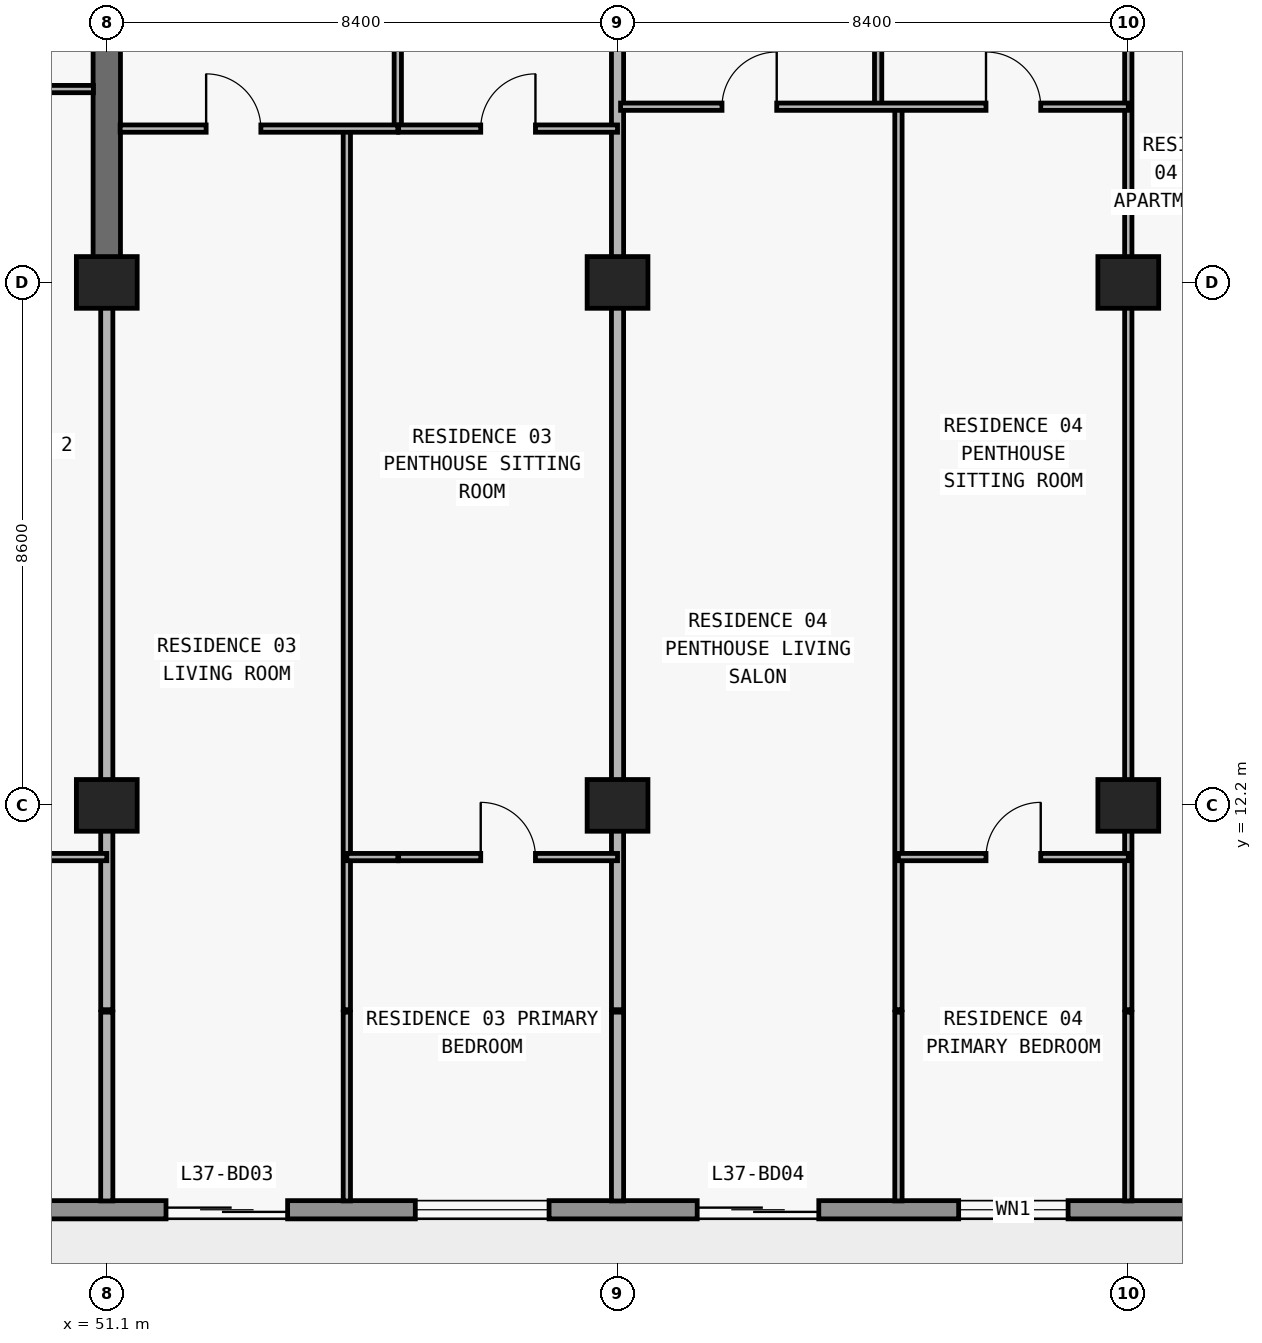
"""IFC4 building model, lengths in metres.
Left out: names, types, materials, properties, quantities, classifications, styles, units other than length and angle.
Written with IfcOpenShell. Run it as: python <this file> out.ifc"""

import sys

from ifc_helpers import new_model, si_unit, direction, frame, frame_2d, origin, origin_2d, place, context, subcontext, project, spatial, rectangle, extrude, element, fill, save


model = new_model("IFC4")
c1 = context("Model", 3, precision=1e-05, world=origin(), true_north=direction((0.0, 1.0)))
c2 = subcontext(c1, "Body", "Model", "MODEL_VIEW")
j1 = project(units=[si_unit("LENGTHUNIT", "METRE"), si_unit("PLANEANGLEUNIT", "RADIAN")], contexts=[c1])
p1 = place(None, origin())
s1 = spatial("IfcSite", under=j1, at=p1, CompositionType="ELEMENT")
p2 = place(p1, origin())
s2 = spatial("IfcBuilding", under=s1, at=p2, CompositionType="ELEMENT")
p3 = place(p2, frame((0.0, 0.0, 135.6)))
s3 = spatial("IfcBuildingStorey", under=s2, at=p3, CompositionType="ELEMENT", Elevation=135.6)
for number, where, z_axis, x_axis in (
    (1, (51.1, 12.2, 0.0), (0.0, 0.0, 1.0), (1.0, 0.0, 0.0)),
    (2, (59.5, 12.2, 0.0), (0.0, 0.0, 1.0), (1.0, 0.0, 0.0)),
    (3, (67.9, 12.2, 0.0), (0.0, 0.0, 1.0), (1.0, 0.0, 0.0)),
    (4, (51.1, 20.8, 0.0), (0.0, 0.0, 1.0), (1.0, 0.0, 0.0)),
    (5, (59.5, 20.8, 0.0), (0.0, 0.0, 1.0), (1.0, 0.0, 0.0)),
    (6, (67.9, 20.8, 0.0), (0.0, 0.0, 1.0), (1.0, 0.0, 0.0)),
):
    element("IfcColumn", number, at=place(p3, frame(where, z_axis=z_axis, x_axis=x_axis)), inside=s3, PredefinedType="COLUMN", context=c2, shape_type="SweptSolid", body=[
        extrude(rectangle(XDim=1.0, YDim=0.85, at=origin_2d()), origin(), (0.0, 0.0, 1.0), 3.05),
    ])
p4 = place(p3, frame((51.1, 20.8, 0.0), z_axis=(0.0, 0.0, 1.0), x_axis=(0.0, 1.0, 0.0)))
e7 = element("IfcWall", 7, at=p4, inside=s3, PredefinedType="SHEAR", context=c2, shape_type="SweptSolid", body=[
    extrude(rectangle(XDim=8.6, YDim=0.45, at=frame_2d((4.3, 0.0))), origin(), (0.0, 0.0, 1.0), 3.05),
])
p5 = place(p3, frame((70.1, 5.55, 0.0), z_axis=(0.0, 0.0, 1.0), x_axis=(-1.0, 0.0, 0.0)))
e8 = element("IfcWall", 8, at=p5, inside=s3, PredefinedType="STANDARD", context=c2, shape_type="SweptSolid", body=[
    extrude(rectangle(XDim=62.4, YDim=0.3, at=frame_2d((31.2, 0.0))), origin(), (0.0, 0.0, 1.0), 3.05),
])
p6 = place(p5, frame((57.29, 0.0, 0.0)))
e9 = element("IfcOpeningElement", 9, at=p6, cuts=e8, PredefinedType="OPENING", context=c2, shape_type="SweptSolid", body=[
    extrude(rectangle(XDim=2.0, YDim=2.3, at=frame_2d((1.0, 1.15))), frame((0.0, 0.16, 0.0), z_axis=(0.0, -1.0, 0.0), x_axis=(1.0, 0.0, 0.0)), (0.0, 0.0, 1.0), 0.32),
])
p7 = place(p5, frame((52.61, 0.0, 0.65)))
e10 = element("IfcOpeningElement", 10, at=p7, cuts=e8, PredefinedType="OPENING", context=c2, shape_type="SweptSolid", body=[
    extrude(rectangle(XDim=2.6, YDim=1.85, at=frame_2d((1.3, 0.925))), frame((0.0, 0.16, 0.0), z_axis=(0.0, -1.0, 0.0), x_axis=(1.0, 0.0, 0.0)), (0.0, 0.0, 1.0), 0.32),
])
p8 = place(p5, frame((46.5, 0.0, 0.85)))
e11 = element("IfcOpeningElement", 11, at=p8, cuts=e8, PredefinedType="OPENING", context=c2, shape_type="SweptSolid", body=[
    extrude(rectangle(XDim=2.2, YDim=1.55, at=frame_2d((1.1, 0.775))), frame((0.0, 0.16, 0.0), z_axis=(0.0, -1.0, 0.0), x_axis=(1.0, 0.0, 0.0)), (0.0, 0.0, 1.0), 0.32),
])
p9 = place(p5, frame((40.49, 0.0, 0.0)))
e12 = element("IfcOpeningElement", 12, at=p9, cuts=e8, PredefinedType="OPENING", context=c2, shape_type="SweptSolid", body=[
    extrude(rectangle(XDim=2.0, YDim=2.3, at=frame_2d((1.0, 1.15))), frame((0.0, 0.16, 0.0), z_axis=(0.0, -1.0, 0.0), x_axis=(1.0, 0.0, 0.0)), (0.0, 0.0, 1.0), 0.32),
])
p10 = place(p5, frame((35.81, 0.0, 0.65)))
e13 = element("IfcOpeningElement", 13, at=p10, cuts=e8, PredefinedType="OPENING", context=c2, shape_type="SweptSolid", body=[
    extrude(rectangle(XDim=2.6, YDim=1.85, at=frame_2d((1.3, 0.925))), frame((0.0, 0.16, 0.0), z_axis=(0.0, -1.0, 0.0), x_axis=(1.0, 0.0, 0.0)), (0.0, 0.0, 1.0), 0.32),
])
p11 = place(p5, frame((30.1, 0.0, 0.85)))
e14 = element("IfcOpeningElement", 14, at=p11, cuts=e8, PredefinedType="OPENING", context=c2, shape_type="SweptSolid", body=[
    extrude(rectangle(XDim=2.2, YDim=1.55, at=frame_2d((1.1, 0.775))), frame((0.0, 0.16, 0.0), z_axis=(0.0, -1.0, 0.0), x_axis=(1.0, 0.0, 0.0)), (0.0, 0.0, 1.0), 0.32),
])
p12 = place(p5, frame((22.1, 0.0, 0.85)))
e15 = element("IfcOpeningElement", 15, at=p12, cuts=e8, PredefinedType="OPENING", context=c2, shape_type="SweptSolid", body=[
    extrude(rectangle(XDim=2.2, YDim=1.55, at=frame_2d((1.1, 0.775))), frame((0.0, 0.16, 0.0), z_axis=(0.0, -1.0, 0.0), x_axis=(1.0, 0.0, 0.0)), (0.0, 0.0, 1.0), 0.32),
])
p13 = place(p5, frame((16.026, 0.0, 0.0)))
e16 = element("IfcOpeningElement", 16, at=p13, cuts=e8, PredefinedType="OPENING", context=c2, shape_type="SweptSolid", body=[
    extrude(rectangle(XDim=2.0, YDim=2.3, at=frame_2d((1.0, 1.15))), frame((0.0, 0.16, 0.0), z_axis=(0.0, -1.0, 0.0), x_axis=(1.0, 0.0, 0.0)), (0.0, 0.0, 1.0), 0.32),
])
p14 = place(p5, frame((11.726, 0.0, 0.85)))
e17 = element("IfcOpeningElement", 17, at=p14, cuts=e8, PredefinedType="OPENING", context=c2, shape_type="SweptSolid", body=[
    extrude(rectangle(XDim=2.2, YDim=1.55, at=frame_2d((1.1, 0.775))), frame((0.0, 0.16, 0.0), z_axis=(0.0, -1.0, 0.0), x_axis=(1.0, 0.0, 0.0)), (0.0, 0.0, 1.0), 0.32),
])
p15 = place(p5, frame((7.29, 0.0, 0.0)))
e18 = element("IfcOpeningElement", 18, at=p15, cuts=e8, PredefinedType="OPENING", context=c2, shape_type="SweptSolid", body=[
    extrude(rectangle(XDim=2.0, YDim=2.3, at=frame_2d((1.0, 1.15))), frame((0.0, 0.16, 0.0), z_axis=(0.0, -1.0, 0.0), x_axis=(1.0, 0.0, 0.0)), (0.0, 0.0, 1.0), 0.32),
])
p16 = place(p5, frame((3.19, 0.0, 0.85)))
e19 = element("IfcOpeningElement", 19, at=p16, cuts=e8, PredefinedType="OPENING", context=c2, shape_type="SweptSolid", body=[
    extrude(rectangle(XDim=1.8, YDim=1.55, at=frame_2d((0.9, 0.775))), frame((0.0, 0.16, 0.0), z_axis=(0.0, -1.0, 0.0), x_axis=(1.0, 0.0, 0.0)), (0.0, 0.0, 1.0), 0.32),
])
p17 = place(p3, frame((51.1, 5.695, 0.0), z_axis=(0.0, 0.0, 1.0), x_axis=(0.0, 1.0, 0.0)))
e20 = element("IfcWall", 20, at=p17, inside=s3, PredefinedType="PARTITIONING", context=c2, shape_type="SweptSolid", body=[
    extrude(rectangle(XDim=3.105, YDim=0.2, at=frame_2d((1.552, 0.0))), origin(), (0.0, 0.0, 1.0), 3.05),
])
p18 = place(p3, frame((51.1, 8.84, 0.0), z_axis=(0.0, 0.0, 1.0), x_axis=(0.0, 1.0, 0.0)))
e21 = element("IfcWall", 21, at=p18, inside=s3, PredefinedType="PARTITIONING", context=c2, shape_type="SweptSolid", body=[
    extrude(rectangle(XDim=11.955, YDim=0.2, at=frame_2d((5.978, 0.0))), origin(), (0.0, 0.0, 1.0), 2.174),
])
p19 = place(p3, frame((55.048, 5.695, 0.0), z_axis=(0.0, 0.0, 1.0), x_axis=(0.0, 1.0, 0.0)))
e22 = element("IfcWall", 22, at=p19, inside=s3, PredefinedType="PARTITIONING", context=c2, shape_type="SweptSolid", body=[
    extrude(rectangle(XDim=3.105, YDim=0.12, at=frame_2d((1.552, 0.0))), origin(), (0.0, 0.0, 1.0), 3.05),
])
p20 = place(p3, frame((55.048, 8.84, 0.0), z_axis=(0.0, 0.0, 1.0), x_axis=(0.0, 1.0, 0.0)))
e23 = element("IfcWall", 23, at=p20, inside=s3, PredefinedType="PARTITIONING", context=c2, shape_type="SweptSolid", body=[
    extrude(rectangle(XDim=14.49, YDim=0.12, at=frame_2d((7.245, 0.0))), origin(), (0.0, 0.0, 1.0), 3.05),
])
p21 = place(p3, frame((55.886, 23.33, 0.0), z_axis=(0.0, 0.0, 1.0), x_axis=(0.0, 1.0, 0.0)))
e24 = element("IfcWall", 24, at=p21, inside=s3, PredefinedType="PARTITIONING", context=c2, shape_type="SweptSolid", body=[
    extrude(rectangle(XDim=5.15, YDim=0.12, at=frame_2d((2.575, 0.0))), origin(), (0.0, 0.0, 1.0), 3.05),
])
p22 = place(p21, frame((2.125, 0.0, 0.0)))
e25 = element("IfcOpeningElement", 25, at=p22, cuts=e24, PredefinedType="OPENING", context=c2, shape_type="SweptSolid", body=[
    extrude(rectangle(XDim=0.9, YDim=2.15, at=frame_2d((0.45, 1.075))), frame((0.0, 0.07, 0.0), z_axis=(0.0, -1.0, 0.0), x_axis=(1.0, 0.0, 0.0)), (0.0, 0.0, 1.0), 0.14),
])
p23 = place(p3, frame((59.5, 5.695, 0.0), z_axis=(0.0, 0.0, 1.0), x_axis=(0.0, 1.0, 0.0)))
e26 = element("IfcWall", 26, at=p23, inside=s3, PredefinedType="PARTITIONING", context=c2, shape_type="SweptSolid", body=[
    extrude(rectangle(XDim=3.105, YDim=0.2, at=frame_2d((1.552, 0.0))), origin(), (0.0, 0.0, 1.0), 3.05),
])
p24 = place(p3, frame((59.5, 8.84, 0.0), z_axis=(0.0, 0.0, 1.0), x_axis=(0.0, 1.0, 0.0)))
e27 = element("IfcWall", 27, at=p24, inside=s3, PredefinedType="PARTITIONING", context=c2, shape_type="SweptSolid", body=[
    extrude(rectangle(XDim=19.94, YDim=0.2, at=frame_2d((9.97, 0.0))), origin(), (0.0, 0.0, 1.0), 2.174),
])
p25 = place(p3, frame((63.786, 23.69, 0.0), z_axis=(0.0, 0.0, 1.0), x_axis=(0.0, 1.0, 0.0)))
e28 = element("IfcWall", 28, at=p25, inside=s3, PredefinedType="PARTITIONING", context=c2, shape_type="SweptSolid", body=[
    extrude(rectangle(XDim=5.09, YDim=0.12, at=frame_2d((2.545, 0.0))), origin(), (0.0, 0.0, 1.0), 2.486),
])
p26 = place(p25, frame((2.095, 0.0, 0.0)))
e29 = element("IfcOpeningElement", 29, at=p26, cuts=e28, PredefinedType="OPENING", context=c2, shape_type="SweptSolid", body=[
    extrude(rectangle(XDim=0.9, YDim=2.15, at=frame_2d((0.45, 1.075))), frame((0.0, 0.07, 0.0), z_axis=(0.0, -1.0, 0.0), x_axis=(1.0, 0.0, 0.0)), (0.0, 0.0, 1.0), 0.14),
])
p27 = place(p3, frame((64.12, 5.695, 0.0), z_axis=(0.0, 0.0, 1.0), x_axis=(0.0, 1.0, 0.0)))
e30 = element("IfcWall", 30, at=p27, inside=s3, PredefinedType="PARTITIONING", context=c2, shape_type="SweptSolid", body=[
    extrude(rectangle(XDim=3.105, YDim=0.12, at=frame_2d((1.552, 0.0))), origin(), (0.0, 0.0, 1.0), 3.05),
])
p28 = place(p3, frame((64.12, 8.84, 0.0), z_axis=(0.0, 0.0, 1.0), x_axis=(0.0, 1.0, 0.0)))
e31 = element("IfcWall", 31, at=p28, inside=s3, PredefinedType="PARTITIONING", context=c2, shape_type="SweptSolid", body=[
    extrude(rectangle(XDim=14.85, YDim=0.12, at=frame_2d((7.425, 0.0))), origin(), (0.0, 0.0, 1.0), 3.05),
])
p29 = place(p3, frame((67.9, 5.695, 0.0), z_axis=(0.0, 0.0, 1.0), x_axis=(0.0, 1.0, 0.0)))
e32 = element("IfcWall", 32, at=p29, inside=s3, PredefinedType="PARTITIONING", context=c2, shape_type="SweptSolid", body=[
    extrude(rectangle(XDim=3.105, YDim=0.12, at=frame_2d((1.552, 0.0))), origin(), (0.0, 0.0, 1.0), 3.05),
])
p30 = place(p3, frame((67.9, 8.84, 0.0), z_axis=(0.0, 0.0, 1.0), x_axis=(0.0, 1.0, 0.0)))
e33 = element("IfcWall", 33, at=p30, inside=s3, PredefinedType="PARTITIONING", context=c2, shape_type="SweptSolid", body=[
    extrude(rectangle(XDim=19.94, YDim=0.12, at=frame_2d((9.97, 0.0))), origin(), (0.0, 0.0, 1.0), 2.174),
])
p31 = place(p30, frame((16.945, 0.0, 0.0)))
e34 = element("IfcOpeningElement", 34, at=p31, cuts=e33, PredefinedType="OPENING", context=c2, shape_type="SweptSolid", body=[
    extrude(rectangle(XDim=0.9, YDim=2.124, at=frame_2d((0.45, 1.062))), frame((0.0, 0.07, 0.0), z_axis=(0.0, -1.0, 0.0), x_axis=(1.0, 0.0, 0.0)), (0.0, 0.0, 1.0), 0.14),
])
p32 = place(p3, frame((35.1, 11.35, 0.0), z_axis=(0.0, 0.0, 1.0), x_axis=(1.0, 0.0, 0.0)))
e35 = element("IfcWall", 35, at=p32, inside=s3, PredefinedType="PARTITIONING", context=c2, shape_type="SweptSolid", body=[
    extrude(rectangle(XDim=16.0, YDim=0.12, at=frame_2d((8.0, 0.0))), origin(), (0.0, 0.0, 1.0), 3.05),
])
p33 = place(p32, frame((3.35, 0.0, 0.0)))
e36 = element("IfcOpeningElement", 36, at=p33, cuts=e35, PredefinedType="OPENING", context=c2, shape_type="SweptSolid", body=[
    extrude(rectangle(XDim=0.9, YDim=2.15, at=frame_2d((0.45, 1.075))), frame((0.0, 0.07, 0.0), z_axis=(0.0, -1.0, 0.0), x_axis=(1.0, 0.0, 0.0)), (0.0, 0.0, 1.0), 0.14),
])
p34 = place(p32, frame((11.35, 0.0, 0.0)))
e37 = element("IfcOpeningElement", 37, at=p34, cuts=e35, PredefinedType="OPENING", context=c2, shape_type="SweptSolid", body=[
    extrude(rectangle(XDim=0.9, YDim=2.15, at=frame_2d((0.45, 1.075))), frame((0.0, 0.07, 0.0), z_axis=(0.0, -1.0, 0.0), x_axis=(1.0, 0.0, 0.0)), (0.0, 0.0, 1.0), 0.14),
])
p35 = place(p3, frame((55.048, 11.35, 0.0), z_axis=(0.0, 0.0, 1.0), x_axis=(1.0, 0.0, 0.0)))
e38 = element("IfcWall", 38, at=p35, inside=s3, PredefinedType="PARTITIONING", context=c2, shape_type="SweptSolid", body=[
    extrude(rectangle(XDim=0.838, YDim=0.12, at=frame_2d((0.419, 0.0))), origin(), (0.0, 0.0, 1.0), 3.05),
])
p36 = place(p3, frame((55.9, 11.35, 0.0), z_axis=(0.0, 0.0, 1.0), x_axis=(1.0, 0.0, 0.0)))
e39 = element("IfcWall", 39, at=p36, inside=s3, PredefinedType="PARTITIONING", context=c2, shape_type="SweptSolid", body=[
    extrude(rectangle(XDim=3.6, YDim=0.12, at=frame_2d((1.8, 0.0))), origin(), (0.0, 0.0, 1.0), 3.05),
])
p37 = place(p36, frame((1.35, 0.0, 0.0)))
e40 = element("IfcOpeningElement", 40, at=p37, cuts=e39, PredefinedType="OPENING", context=c2, shape_type="SweptSolid", body=[
    extrude(rectangle(XDim=0.9, YDim=2.15, at=frame_2d((0.45, 1.075))), frame((0.0, 0.07, 0.0), z_axis=(0.0, -1.0, 0.0), x_axis=(1.0, 0.0, 0.0)), (0.0, 0.0, 1.0), 0.14),
])
p38 = place(p3, frame((64.12, 11.35, 0.0), z_axis=(0.0, 0.0, 1.0), x_axis=(1.0, 0.0, 0.0)))
e41 = element("IfcWall", 41, at=p38, inside=s3, PredefinedType="PARTITIONING", context=c2, shape_type="SweptSolid", body=[
    extrude(rectangle(XDim=3.78, YDim=0.12, at=frame_2d((1.89, 0.0))), origin(), (0.0, 0.0, 1.0), 3.05),
])
p39 = place(p38, frame((1.44, 0.0, 0.0)))
e42 = element("IfcOpeningElement", 42, at=p39, cuts=e41, PredefinedType="OPENING", context=c2, shape_type="SweptSolid", body=[
    extrude(rectangle(XDim=0.9, YDim=2.15, at=frame_2d((0.45, 1.075))), frame((0.0, 0.07, 0.0), z_axis=(0.0, -1.0, 0.0), x_axis=(1.0, 0.0, 0.0)), (0.0, 0.0, 1.0), 0.14),
])
p40 = place(p3, frame((51.32, 23.33, 0.0), z_axis=(0.0, 0.0, 1.0), x_axis=(1.0, 0.0, 0.0)))
e43 = element("IfcWall", 43, at=p40, inside=s3, PredefinedType="PARTITIONING", context=c2, shape_type="SweptSolid", body=[
    extrude(rectangle(XDim=4.566, YDim=0.12, at=frame_2d((2.283, 0.0))), origin(), (0.0, 0.0, 1.0), 3.05),
])
p41 = place(p40, frame((1.414, 0.0, 0.0)))
e44 = element("IfcOpeningElement", 44, at=p41, cuts=e43, PredefinedType="OPENING", context=c2, shape_type="SweptSolid", body=[
    extrude(rectangle(XDim=0.9, YDim=2.15, at=frame_2d((0.45, 1.075))), frame((0.0, 0.07, 0.0), z_axis=(0.0, -1.0, 0.0), x_axis=(1.0, 0.0, 0.0)), (0.0, 0.0, 1.0), 0.14),
])
p42 = place(p3, frame((55.9, 23.33, 0.0), z_axis=(0.0, 0.0, 1.0), x_axis=(1.0, 0.0, 0.0)))
e45 = element("IfcWall", 45, at=p42, inside=s3, PredefinedType="PARTITIONING", context=c2, shape_type="SweptSolid", body=[
    extrude(rectangle(XDim=3.6, YDim=0.12, at=frame_2d((1.8, 0.0))), origin(), (0.0, 0.0, 1.0), 3.05),
])
p43 = place(p42, frame((1.35, 0.0, 0.0)))
e46 = element("IfcOpeningElement", 46, at=p43, cuts=e45, PredefinedType="OPENING", context=c2, shape_type="SweptSolid", body=[
    extrude(rectangle(XDim=0.9, YDim=2.15, at=frame_2d((0.45, 1.075))), frame((0.0, 0.07, 0.0), z_axis=(0.0, -1.0, 0.0), x_axis=(1.0, 0.0, 0.0)), (0.0, 0.0, 1.0), 0.14),
])
p44 = place(p3, frame((59.55, 23.69, 0.0), z_axis=(0.0, 0.0, 1.0), x_axis=(1.0, 0.0, 0.0)))
e47 = element("IfcWall", 47, at=p44, inside=s3, PredefinedType="PARTITIONING", context=c2, shape_type="SweptSolid", body=[
    extrude(rectangle(XDim=8.35, YDim=0.12, at=frame_2d((4.175, 0.0))), origin(), (0.0, 0.0, 1.0), 3.05),
])
p45 = place(p44, frame((1.668, 0.0, 0.0)))
e48 = element("IfcOpeningElement", 48, at=p45, cuts=e47, PredefinedType="OPENING", context=c2, shape_type="SweptSolid", body=[
    extrude(rectangle(XDim=0.9, YDim=2.15, at=frame_2d((0.45, 1.075))), frame((0.0, 0.07, 0.0), z_axis=(0.0, -1.0, 0.0), x_axis=(1.0, 0.0, 0.0)), (0.0, 0.0, 1.0), 0.14),
])
p46 = place(p44, frame((6.01, 0.0, 0.0)))
e49 = element("IfcOpeningElement", 49, at=p46, cuts=e47, PredefinedType="OPENING", context=c2, shape_type="SweptSolid", body=[
    extrude(rectangle(XDim=0.9, YDim=2.15, at=frame_2d((0.45, 1.075))), frame((0.0, 0.07, 0.0), z_axis=(0.0, -1.0, 0.0), x_axis=(1.0, 0.0, 0.0)), (0.0, 0.0, 1.0), 0.14),
])
p47 = place(p3, frame((42.7, 23.98, 0.0), z_axis=(0.0, 0.0, 1.0), x_axis=(1.0, 0.0, 0.0)))
e50 = element("IfcWall", 50, at=p47, inside=s3, PredefinedType="PARTITIONING", context=c2, shape_type="SweptSolid", body=[
    extrude(rectangle(XDim=8.18, YDim=0.12, at=frame_2d((4.09, 0.0))), origin(), (0.0, 0.0, 1.0), 3.05),
])
p48 = place(p47, frame((3.64, 0.0, 0.0)))
e51 = element("IfcOpeningElement", 51, at=p48, cuts=e50, PredefinedType="OPENING", context=c2, shape_type="SweptSolid", body=[
    extrude(rectangle(XDim=0.9, YDim=2.15, at=frame_2d((0.45, 1.075))), frame((0.0, 0.07, 0.0), z_axis=(0.0, -1.0, 0.0), x_axis=(1.0, 0.0, 0.0)), (0.0, 0.0, 1.0), 0.14),
])
p49 = place(p13, origin())
e52 = element("IfcDoor", 52, at=p49, inside=s3, OperationType="DOUBLE_DOOR_SLIDING", PredefinedType="DOOR", context=c2, shape_type="SweptSolid", body=[
    extrude(rectangle(XDim=2.0, YDim=2.3, at=frame_2d((1.0, 1.15))), frame((0.0, 0.025, 0.0), z_axis=(0.0, -1.0, 0.0), x_axis=(1.0, 0.0, 0.0)), (0.0, 0.0, 1.0), 0.05),
])
fill(e16, e52)
p50 = place(p14, origin())
e53 = element("IfcWindow", 53, at=p50, inside=s3, PartitioningType="SINGLE_PANEL", PredefinedType="WINDOW", context=c2, shape_type="SweptSolid", body=[
    extrude(rectangle(XDim=2.2, YDim=1.55, at=frame_2d((1.1, 0.775))), frame((0.0, 0.03, 0.0), z_axis=(0.0, -1.0, 0.0), x_axis=(1.0, 0.0, 0.0)), (0.0, 0.0, 1.0), 0.06),
])
fill(e17, e53)
p51 = place(p15, origin())
e54 = element("IfcDoor", 54, at=p51, inside=s3, OperationType="DOUBLE_DOOR_SLIDING", PredefinedType="DOOR", context=c2, shape_type="SweptSolid", body=[
    extrude(rectangle(XDim=2.0, YDim=2.3, at=frame_2d((1.0, 1.15))), frame((0.0, 0.025, 0.0), z_axis=(0.0, -1.0, 0.0), x_axis=(1.0, 0.0, 0.0)), (0.0, 0.0, 1.0), 0.05),
])
fill(e18, e54)
p52 = place(p16, origin())
e55 = element("IfcWindow", 55, at=p52, inside=s3, PartitioningType="SINGLE_PANEL", PredefinedType="WINDOW", context=c2, shape_type="SweptSolid", body=[
    extrude(rectangle(XDim=1.8, YDim=1.55, at=frame_2d((0.9, 0.775))), frame((0.0, 0.03, 0.0), z_axis=(0.0, -1.0, 0.0), x_axis=(1.0, 0.0, 0.0)), (0.0, 0.0, 1.0), 0.06),
])
fill(e19, e55)
p53 = place(p41, origin())
e56 = element("IfcDoor", 56, at=p53, inside=s3, OperationType="SINGLE_SWING_LEFT", PredefinedType="DOOR", context=c2, shape_type="SweptSolid", body=[
    extrude(rectangle(XDim=0.9, YDim=2.15, at=frame_2d((0.45, 1.075))), frame((0.0, 0.025, 0.0), z_axis=(0.0, -1.0, 0.0), x_axis=(1.0, 0.0, 0.0)), (0.0, 0.0, 1.0), 0.05),
])
fill(e44, e56)
p54 = place(p43, origin())
e57 = element("IfcDoor", 57, at=p54, inside=s3, OperationType="SINGLE_SWING_RIGHT", PredefinedType="DOOR", context=c2, shape_type="SweptSolid", body=[
    extrude(rectangle(XDim=0.9, YDim=2.15, at=frame_2d((0.45, 1.075))), frame((0.0, 0.025, 0.0), z_axis=(0.0, -1.0, 0.0), x_axis=(1.0, 0.0, 0.0)), (0.0, 0.0, 1.0), 0.05),
])
fill(e46, e57)
p55 = place(p37, origin())
e58 = element("IfcDoor", 58, at=p55, inside=s3, OperationType="SINGLE_SWING_LEFT", PredefinedType="DOOR", context=c2, shape_type="SweptSolid", body=[
    extrude(rectangle(XDim=0.9, YDim=2.15, at=frame_2d((0.45, 1.075))), frame((0.0, 0.025, 0.0), z_axis=(0.0, -1.0, 0.0), x_axis=(1.0, 0.0, 0.0)), (0.0, 0.0, 1.0), 0.05),
])
fill(e40, e58)
p56 = place(p45, origin())
e59 = element("IfcDoor", 59, at=p56, inside=s3, OperationType="SINGLE_SWING_RIGHT", PredefinedType="DOOR", context=c2, shape_type="SweptSolid", body=[
    extrude(rectangle(XDim=0.9, YDim=2.15, at=frame_2d((0.45, 1.075))), frame((0.0, 0.025, 0.0), z_axis=(0.0, -1.0, 0.0), x_axis=(1.0, 0.0, 0.0)), (0.0, 0.0, 1.0), 0.05),
])
fill(e48, e59)
p57 = place(p46, origin())
e60 = element("IfcDoor", 60, at=p57, inside=s3, OperationType="SINGLE_SWING_LEFT", PredefinedType="DOOR", context=c2, shape_type="SweptSolid", body=[
    extrude(rectangle(XDim=0.9, YDim=2.15, at=frame_2d((0.45, 1.075))), frame((0.0, 0.025, 0.0), z_axis=(0.0, -1.0, 0.0), x_axis=(1.0, 0.0, 0.0)), (0.0, 0.0, 1.0), 0.05),
])
fill(e49, e60)
p58 = place(p39, origin())
e61 = element("IfcDoor", 61, at=p58, inside=s3, OperationType="SINGLE_SWING_RIGHT", PredefinedType="DOOR", context=c2, shape_type="SweptSolid", body=[
    extrude(rectangle(XDim=0.9, YDim=2.15, at=frame_2d((0.45, 1.075))), frame((0.0, 0.025, 0.0), z_axis=(0.0, -1.0, 0.0), x_axis=(1.0, 0.0, 0.0)), (0.0, 0.0, 1.0), 0.05),
])
fill(e42, e61)
save(model, sys.argv[1])
